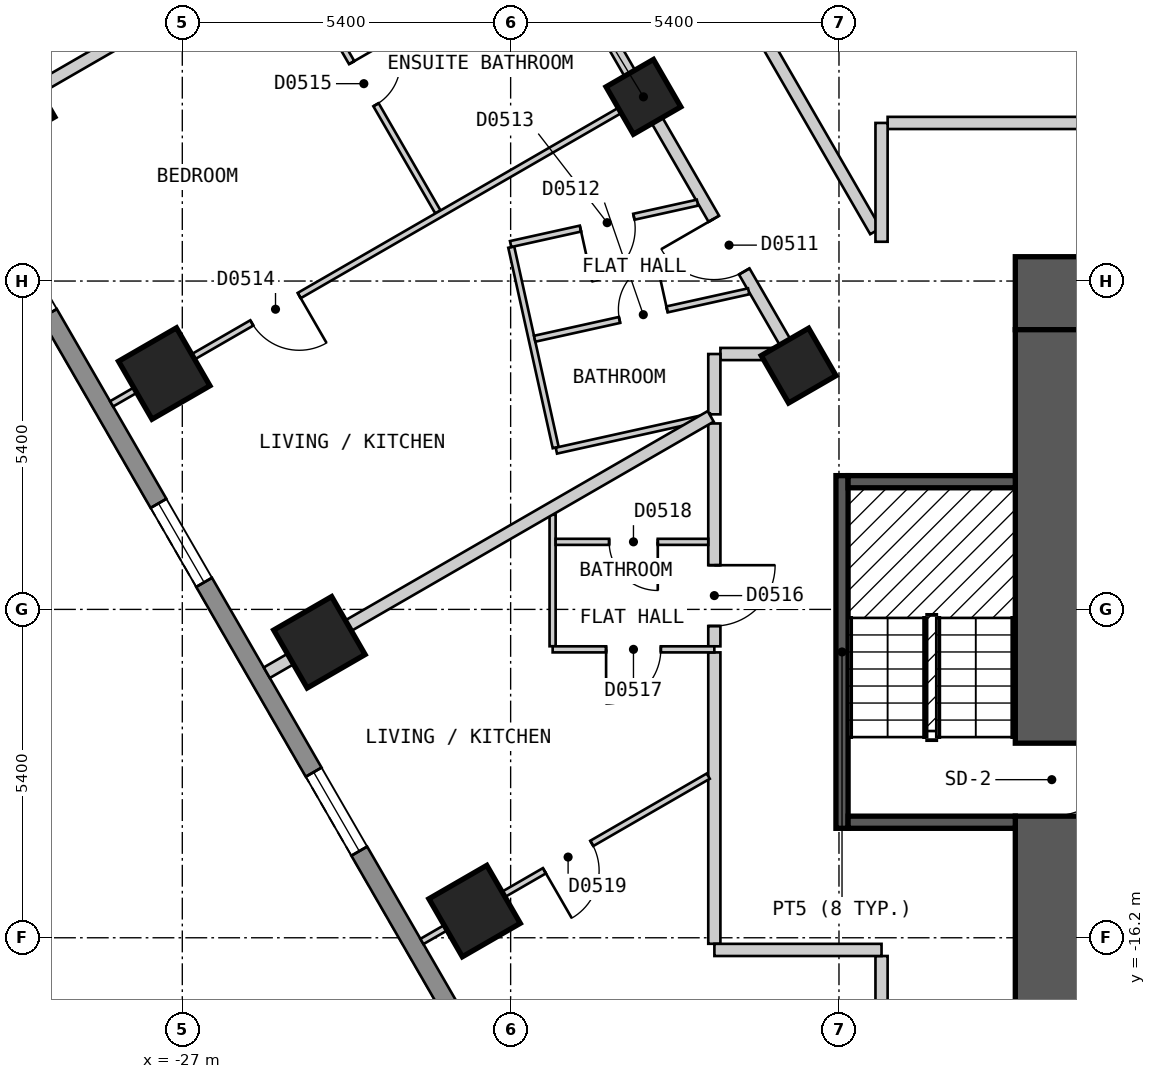
"""IFC4 building model, lengths in metres.
Left out: names, types, materials, properties, quantities, classifications, styles, units other than length and angle.
Written with IfcOpenShell. Run it as: python <this file> out.ifc"""

import sys

from ifc_helpers import new_model, si_unit, direction, frame, frame_2d, origin, origin_2d, place, context, subcontext, project, spatial, polyline, rectangle, outline, extrude, element, fill, save


model = new_model("IFC4")
c1 = context("Model", 3, precision=1e-05, world=origin(), true_north=direction((0.0, 1.0)))
c2 = subcontext(c1, "Body", "Model", "MODEL_VIEW")
j1 = project(units=[si_unit("LENGTHUNIT", "METRE"), si_unit("PLANEANGLEUNIT", "RADIAN")], contexts=[c1])
p1 = place(None, origin())
s1 = spatial("IfcSite", under=j1, at=p1, CompositionType="ELEMENT")
p2 = place(p1, origin())
s2 = spatial("IfcBuilding", under=s1, at=p2, CompositionType="ELEMENT")
p3 = place(p2, frame((0.0, 0.0, 56.4)))
s3 = spatial("IfcBuildingStorey", under=s2, at=p3, CompositionType="ELEMENT", Elevation=56.4)
for number, where, z_axis, x_axis in (
    (1, (-29.848, -2.5, 0.0), (0.0, 0.0, 1.0), (0.5, -0.866, 0.0)),
    (2, (-27.297, -6.921, 0.0), (0.0, 0.0, 1.0), (0.5, -0.866, 0.0)),
    (3, (-24.745, -11.341, 0.0), (0.0, 0.0, 1.0), (0.5, -0.866, 0.0)),
    (4, (-22.193, -15.761, 0.0), (0.0, 0.0, 1.0), (0.5, -0.866, 0.0)),
):
    element("IfcColumn", number, at=place(p3, frame(where, z_axis=z_axis, x_axis=x_axis)), inside=s3, PredefinedType="COLUMN", context=c2, shape_type="SweptSolid", body=[
        extrude(rectangle(XDim=1.1, YDim=1.1, at=origin_2d()), origin(), (0.0, 0.0, 1.0), 3.0),
    ])
for number, where, z_axis, x_axis in (
    (5, (-19.416, -2.371, 0.0), (0.0, 0.0, 1.0), (0.5, -0.866, 0.0)),
    (6, (-16.864, -6.791, 0.0), (0.0, 0.0, 1.0), (0.5, -0.866, 0.0)),
):
    element("IfcColumn", number, at=place(p3, frame(where, z_axis=z_axis, x_axis=x_axis)), inside=s3, PredefinedType="COLUMN", context=c2, shape_type="SweptSolid", body=[
        extrude(rectangle(XDim=0.9, YDim=0.9, at=origin_2d()), origin(), (0.0, 0.0, 1.0), 3.0),
    ])
p4 = place(p3, frame((-13.3, -5.6, 0.0), z_axis=(0.0, 0.0, 1.0), x_axis=(1.0, 0.0, 0.0)))
e7 = element("IfcWall", 7, at=p4, inside=s3, PredefinedType="SHEAR", context=c2, shape_type="SweptSolid", body=[
    extrude(rectangle(XDim=26.6, YDim=1.2, at=frame_2d((13.3, 0.0))), origin(), (0.0, 0.0, 1.0), 2.7),
])
p5 = place(p4, frame((23.65, 0.0, 0.0)))
e8 = element("IfcOpeningElement", 8, at=p5, cuts=e7, PredefinedType="OPENING", context=c2, shape_type="SweptSolid", body=[
    extrude(rectangle(XDim=1.2, YDim=2.1, at=frame_2d((0.6, 1.05))), frame((0.0, 0.61, 0.0), z_axis=(0.0, -1.0, 0.0), x_axis=(1.0, 0.0, 0.0)), (0.0, 0.0, 1.0), 1.22),
])
p6 = place(p3, frame((-12.7, -17.8, 0.0), z_axis=(0.0, 0.0, 1.0), x_axis=(0.0, 1.0, 0.0)))
e9 = element("IfcWall", 9, at=p6, inside=s3, PredefinedType="SHEAR", context=c2, shape_type="SweptSolid", body=[
    extrude(rectangle(XDim=11.6, YDim=1.2, at=frame_2d((5.8, 0.0))), origin(), (0.0, 0.0, 1.0), 2.7),
])
p7 = place(p6, frame((3.6, 0.0, 0.0)))
e10 = element("IfcOpeningElement", 10, at=p7, cuts=e9, PredefinedType="OPENING", context=c2, shape_type="SweptSolid", body=[
    extrude(rectangle(XDim=1.2, YDim=2.1, at=frame_2d((0.6, 1.05))), frame((0.0, 0.61, 0.0), z_axis=(0.0, -1.0, 0.0), x_axis=(1.0, 0.0, 0.0)), (0.0, 0.0, 1.0), 1.22),
])
p8 = place(p3, frame((-31.22, -2.425, 0.0), z_axis=(0.0, 0.0, 1.0), x_axis=(0.500001938803, -0.866024284413, 0.0)))
e11 = element("IfcWall", 11, at=p8, inside=s3, PredefinedType="SOLIDWALL", context=c2, shape_type="SweptSolid", body=[
    extrude(outline(polyline([(0.0, -0.15), (27.02, -0.15), (26.94, 0.15), (0.08, 0.15), (0.0, -0.15)])), origin(), (0.0, 0.0, 1.0), 2.7),
])
p9 = place(p8, frame((2.553, 0.0, 0.15)))
e12 = element("IfcOpeningElement", 12, at=p9, cuts=e11, PredefinedType="OPENING", context=c2, shape_type="SweptSolid", body=[
    extrude(rectangle(XDim=1.5, YDim=2.1, at=frame_2d((0.75, 1.05))), frame((0.0, 0.16, 0.0), z_axis=(0.0, -1.0, 0.0), x_axis=(1.0, 0.0, 0.0)), (0.0, 0.0, 1.0), 0.32),
])
p10 = place(p8, frame((7.657, 0.0, 0.15)))
e13 = element("IfcOpeningElement", 13, at=p10, cuts=e11, PredefinedType="OPENING", context=c2, shape_type="SweptSolid", body=[
    extrude(rectangle(XDim=1.5, YDim=2.1, at=frame_2d((0.75, 1.05))), frame((0.0, 0.16, 0.0), z_axis=(0.0, -1.0, 0.0), x_axis=(1.0, 0.0, 0.0)), (0.0, 0.0, 1.0), 0.32),
])
p11 = place(p8, frame((12.761, 0.0, 0.15)))
e14 = element("IfcOpeningElement", 14, at=p11, cuts=e11, PredefinedType="OPENING", context=c2, shape_type="SweptSolid", body=[
    extrude(rectangle(XDim=1.5, YDim=2.1, at=frame_2d((0.75, 1.05))), frame((0.0, 0.16, 0.0), z_axis=(0.0, -1.0, 0.0), x_axis=(1.0, 0.0, 0.0)), (0.0, 0.0, 1.0), 0.32),
])
p12 = place(p8, frame((17.865, 0.0, 0.15)))
e15 = element("IfcOpeningElement", 15, at=p12, cuts=e11, PredefinedType="OPENING", context=c2, shape_type="SweptSolid", body=[
    extrude(rectangle(XDim=1.5, YDim=2.1, at=frame_2d((0.75, 1.05))), frame((0.0, 0.16, 0.0), z_axis=(0.0, -1.0, 0.0), x_axis=(1.0, 0.0, 0.0)), (0.0, 0.0, 1.0), 0.32),
])
p13 = place(p8, frame((22.969, 0.0, 0.15)))
e16 = element("IfcOpeningElement", 16, at=p13, cuts=e11, PredefinedType="OPENING", context=c2, shape_type="SweptSolid", body=[
    extrude(rectangle(XDim=1.5, YDim=2.1, at=frame_2d((0.75, 1.05))), frame((0.0, 0.16, 0.0), z_axis=(0.0, -1.0, 0.0), x_axis=(1.0, 0.0, 0.0)), (0.0, 0.0, 1.0), 0.32),
])
p14 = place(p3, frame((-18.186, -0.101, 0.0), z_axis=(0.0, 0.0, 1.0), x_axis=(0.499997591167, -0.86602679452, 0.0)))
e17 = element("IfcWall", 17, at=p14, inside=s3, PredefinedType="PARTITIONING", context=c2, shape_type="SweptSolid", body=[
    extrude(rectangle(XDim=5.172, YDim=0.2, at=frame_2d((2.586, 0.0))), origin(), (0.0, 0.0, 1.0), 2.7),
])
p15 = place(p3, frame((-20.727, -0.101, 0.0), z_axis=(0.0, 0.0, 1.0), x_axis=(0.500065652488, -0.865987495984, 0.0)))
e18 = element("IfcWall", 18, at=p15, inside=s3, PredefinedType="PARTITIONING", context=c2, shape_type="SweptSolid", body=[
    extrude(rectangle(XDim=7.389, YDim=0.2, at=frame_2d((3.695, 0.0))), origin(), (0.0, 0.0, 1.0), 2.7),
])
p16 = place(p15, frame((4.937, 0.0, 0.0)))
e19 = element("IfcOpeningElement", 19, at=p16, cuts=e18, PredefinedType="OPENING", context=c2, shape_type="SweptSolid", body=[
    extrude(rectangle(XDim=1.0, YDim=2.1, at=frame_2d((0.5, 1.05))), frame((0.0, 0.11, 0.0), z_axis=(0.0, -1.0, 0.0), x_axis=(1.0, 0.0, 0.0)), (0.0, 0.0, 1.0), 0.22),
])
p17 = place(p3, frame((-15.5, -16.5, 0.0), z_axis=(0.0, 0.0, 1.0), x_axis=(0.0, -1.0, 0.0)))
e20 = element("IfcWall", 20, at=p17, inside=s3, PredefinedType="PARTITIONING", context=c2, shape_type="SweptSolid", body=[
    extrude(rectangle(XDim=1.175, YDim=0.2, at=frame_2d((0.587, 0.0))), origin(), (0.0, 0.0, 1.0), 2.7),
])
p18 = place(p3, frame((-18.25, -11.507, 0.0), z_axis=(0.0, 0.0, 1.0), x_axis=(0.0, -1.0, 0.0)))
e21 = element("IfcWall", 21, at=p18, inside=s3, PredefinedType="PARTITIONING", context=c2, shape_type="SweptSolid", body=[
    extrude(rectangle(XDim=4.792, YDim=0.2, at=frame_2d((2.396, 0.0))), origin(), (0.0, 0.0, 1.0), 2.7),
])
p19 = place(p3, frame((-18.15, -6.6, 0.0), z_axis=(0.0, 0.0, 1.0), x_axis=(1.0, 0.0, 0.0)))
e22 = element("IfcWall", 22, at=p19, inside=s3, PredefinedType="PARTITIONING", context=c2, shape_type="SweptSolid", body=[
    extrude(rectangle(XDim=1.176, YDim=0.2, at=frame_2d((0.588, 0.0))), origin(), (0.0, 0.0, 1.0), 2.7),
])
p20 = place(p3, frame((-18.249, -16.4, 0.0), z_axis=(0.0, 0.0, 1.0), x_axis=(1.0, 0.0, 0.0)))
e23 = element("IfcWall", 23, at=p20, inside=s3, PredefinedType="PARTITIONING", context=c2, shape_type="SweptSolid", body=[
    extrude(rectangle(XDim=2.749, YDim=0.2, at=frame_2d((1.375, 0.0))), origin(), (0.0, 0.0, 1.0), 2.7),
])
p21 = place(p3, frame((-15.4, -2.8, 0.0), z_axis=(0.0, 0.0, 1.0), x_axis=(1.0, 0.0, 0.0)))
e24 = element("IfcWall", 24, at=p21, inside=s3, PredefinedType="PARTITIONING", context=c2, shape_type="SweptSolid", body=[
    extrude(rectangle(XDim=8.372, YDim=0.2, at=frame_2d((4.186, 0.0))), origin(), (0.0, 0.0, 1.0), 2.7),
])
p22 = place(p3, frame((-15.5, -4.754, 0.0), z_axis=(0.0, 0.0, 1.0), x_axis=(0.0, 1.0, 0.0)))
e25 = element("IfcWall", 25, at=p22, inside=s3, PredefinedType="PARTITIONING", context=c2, shape_type="SweptSolid", body=[
    extrude(rectangle(XDim=1.954, YDim=0.2, at=frame_2d((0.977, 0.0))), origin(), (0.0, 0.0, 1.0), 2.7),
])
p23 = place(p3, frame((-18.25, -11.407, 0.0), z_axis=(0.0, 0.0, 1.0), x_axis=(0.0, 1.0, 0.0)))
e26 = element("IfcWall", 26, at=p23, inside=s3, PredefinedType="PARTITIONING", context=c2, shape_type="SweptSolid", body=[
    extrude(rectangle(XDim=3.665, YDim=0.2, at=frame_2d((1.833, 0.0))), origin(), (0.0, 0.0, 1.0), 2.7),
])
p24 = place(p23, frame((0.334, 0.0, 0.0)))
e27 = element("IfcOpeningElement", 27, at=p24, cuts=e26, PredefinedType="OPENING", context=c2, shape_type="SweptSolid", body=[
    extrude(rectangle(XDim=1.0, YDim=2.1, at=frame_2d((0.5, 1.05))), frame((0.0, 0.11, 0.0), z_axis=(0.0, -1.0, 0.0), x_axis=(1.0, 0.0, 0.0)), (0.0, 0.0, 1.0), 0.22),
])
p25 = place(p3, frame((-18.25, -7.592, 0.0), z_axis=(0.0, 0.0, 1.0), x_axis=(0.0, 1.0, 0.0)))
e28 = element("IfcWall", 28, at=p25, inside=s3, PredefinedType="PARTITIONING", context=c2, shape_type="SweptSolid", body=[
    extrude(rectangle(XDim=0.992, YDim=0.2, at=frame_2d((0.496, 0.0))), origin(), (0.0, 0.0, 1.0), 2.7),
])
p26 = place(p3, frame((-25.2, -0.101, 0.0), z_axis=(0.0, 0.0, 1.0), x_axis=(0.500099052605, -0.865968208183, 0.0)))
e29 = element("IfcWall", 29, at=p26, inside=s3, PredefinedType="PARTITIONING", context=c2, shape_type="SweptSolid", body=[
    extrude(rectangle(XDim=4.807, YDim=0.1, at=frame_2d((2.404, 0.0))), origin(), (0.0, 0.0, 1.0), 2.7),
])
p27 = place(p26, frame((1.971, 0.0, 0.0)))
e30 = element("IfcOpeningElement", 30, at=p27, cuts=e29, PredefinedType="OPENING", context=c2, shape_type="SweptSolid", body=[
    extrude(rectangle(XDim=0.8, YDim=2.1, at=frame_2d((0.4, 1.05))), frame((0.0, 0.06, 0.0), z_axis=(0.0, -1.0, 0.0), x_axis=(1.0, 0.0, 0.0)), (0.0, 0.0, 1.0), 0.12),
])
p28 = place(p3, frame((-21.59, -4.842, 0.0), z_axis=(0.0, 0.0, 1.0), x_axis=(0.216524734289, -0.976277132499, 0.0)))
e31 = element("IfcWall", 31, at=p28, inside=s3, PredefinedType="PARTITIONING", context=c2, shape_type="SweptSolid", body=[
    extrude(rectangle(XDim=3.377, YDim=0.1, at=frame_2d((1.688, 0.0))), origin(), (0.0, 0.0, 1.0), 2.7),
])
p29 = place(p3, frame((-20.91, -9.243, 0.0), z_axis=(0.0, 0.0, 1.0), x_axis=(0.0, -1.0, 0.0)))
e32 = element("IfcWall", 32, at=p29, inside=s3, PredefinedType="PARTITIONING", context=c2, shape_type="SweptSolid", body=[
    extrude(rectangle(XDim=2.163, YDim=0.1, at=frame_2d((1.082, 0.0))), origin(), (0.0, 0.0, 1.0), 2.7),
])
p30 = place(p3, frame((-20.86, -9.689, 0.0), z_axis=(0.0, 0.0, 1.0), x_axis=(1.0, 0.0, 0.0)))
e33 = element("IfcWall", 33, at=p30, inside=s3, PredefinedType="PARTITIONING", context=c2, shape_type="SweptSolid", body=[
    extrude(rectangle(XDim=2.51, YDim=0.1, at=frame_2d((1.255, 0.0))), origin(), (0.0, 0.0, 1.0), 2.7),
])
p31 = place(p30, frame((0.88, 0.0, 0.0)))
e34 = element("IfcOpeningElement", 34, at=p31, cuts=e33, PredefinedType="OPENING", context=c2, shape_type="SweptSolid", body=[
    extrude(rectangle(XDim=0.8, YDim=2.1, at=frame_2d((0.4, 1.05))), frame((0.0, 0.06, 0.0), z_axis=(0.0, -1.0, 0.0), x_axis=(1.0, 0.0, 0.0)), (0.0, 0.0, 1.0), 0.12),
])
p32 = place(p3, frame((-20.909, -11.457, 0.0), z_axis=(0.0, 0.0, 1.0), x_axis=(1.0, 0.0, 0.0)))
e35 = element("IfcWall", 35, at=p32, inside=s3, PredefinedType="PARTITIONING", context=c2, shape_type="SweptSolid", body=[
    extrude(rectangle(XDim=2.659, YDim=0.1, at=frame_2d((1.33, 0.0))), origin(), (0.0, 0.0, 1.0), 2.7),
])
p33 = place(p32, frame((0.879, 0.0, 0.0)))
e36 = element("IfcOpeningElement", 36, at=p33, cuts=e35, PredefinedType="OPENING", context=c2, shape_type="SweptSolid", body=[
    extrude(rectangle(XDim=0.9, YDim=2.1, at=frame_2d((0.45, 1.05))), frame((0.0, 0.06, 0.0), z_axis=(0.0, -1.0, 0.0), x_axis=(1.0, 0.0, 0.0)), (0.0, 0.0, 1.0), 0.12),
])
p34 = place(p3, frame((-20.848, -8.189, 0.0), z_axis=(0.0, 0.0, 1.0), x_axis=(0.976266547712, 0.216572453971, 0.0)))
e37 = element("IfcWall", 37, at=p34, inside=s3, PredefinedType="PARTITIONING", context=c2, shape_type="SweptSolid", body=[
    extrude(rectangle(XDim=2.6, YDim=0.1, at=frame_2d((1.3, 0.0))), origin(), (0.0, 0.0, 1.0), 2.7),
])
p35 = place(p3, frame((-21.205, -6.349, 0.0), z_axis=(0.0, 0.0, 1.0), x_axis=(0.976315944397, 0.216349663084, 0.0)))
e38 = element("IfcWall", 38, at=p35, inside=s3, PredefinedType="PARTITIONING", context=c2, shape_type="SweptSolid", body=[
    extrude(rectangle(XDim=3.605, YDim=0.1, at=frame_2d((1.803, 0.0))), origin(), (0.0, 0.0, 1.0), 2.7),
])
p36 = place(p35, frame((1.43, 0.0, 0.0)))
e39 = element("IfcOpeningElement", 39, at=p36, cuts=e38, PredefinedType="OPENING", context=c2, shape_type="SweptSolid", body=[
    extrude(rectangle(XDim=0.8, YDim=2.1, at=frame_2d((0.4, 1.05))), frame((0.0, 0.06, 0.0), z_axis=(0.0, -1.0, 0.0), x_axis=(1.0, 0.0, 0.0)), (0.0, 0.0, 1.0), 0.12),
])
p37 = place(p3, frame((-21.6, -4.792, 0.0), z_axis=(0.0, 0.0, 1.0), x_axis=(0.976320106661, 0.216330879278, 0.0)))
e40 = element("IfcWall", 40, at=p37, inside=s3, PredefinedType="PARTITIONING", context=c2, shape_type="SweptSolid", body=[
    extrude(rectangle(XDim=3.147, YDim=0.1, at=frame_2d((1.574, 0.0))), origin(), (0.0, 0.0, 1.0), 2.7),
])
p38 = place(p37, frame((1.176, 0.0, 0.0)))
e41 = element("IfcOpeningElement", 41, at=p38, cuts=e40, PredefinedType="OPENING", context=c2, shape_type="SweptSolid", body=[
    extrude(rectangle(XDim=0.9, YDim=2.1, at=frame_2d((0.45, 1.05))), frame((0.0, 0.06, 0.0), z_axis=(0.0, -1.0, 0.0), x_axis=(1.0, 0.0, 0.0)), (0.0, 0.0, 1.0), 0.12),
])
p39 = place(p3, frame((-23.059, -16.261, 0.0), z_axis=(0.0, 0.0, 1.0), x_axis=(0.866004639177, 0.500035963631, 0.0)))
e42 = element("IfcWall", 42, at=p39, inside=s3, PredefinedType="PARTITIONING", context=c2, shape_type="SweptSolid", body=[
    extrude(rectangle(XDim=5.438, YDim=0.1, at=frame_2d((2.719, 0.0))), origin(), (0.0, 0.0, 1.0), 2.7),
])
p40 = place(p39, frame((2.326, 0.0, 0.0)))
e43 = element("IfcOpeningElement", 43, at=p40, cuts=e42, PredefinedType="OPENING", context=c2, shape_type="SweptSolid", body=[
    extrude(rectangle(XDim=0.9, YDim=2.1, at=frame_2d((0.45, 1.05))), frame((0.0, 0.06, 0.0), z_axis=(0.0, -1.0, 0.0), x_axis=(1.0, 0.0, 0.0)), (0.0, 0.0, 1.0), 0.12),
])
p41 = place(p3, frame((-28.163, -7.42, 0.0), z_axis=(0.0, 0.0, 1.0), x_axis=(0.866065245018, 0.499930986609, 0.0)))
e44 = element("IfcWall", 44, at=p41, inside=s3, PredefinedType="PARTITIONING", context=c2, shape_type="SweptSolid", body=[
    extrude(rectangle(XDim=10.0, YDim=0.1, at=frame_2d((5.0, 0.0))), origin(), (0.0, 0.0, 1.0), 2.7),
])
p42 = place(p41, frame((2.663, 0.0, 0.0)))
e45 = element("IfcOpeningElement", 45, at=p42, cuts=e44, PredefinedType="OPENING", context=c2, shape_type="SweptSolid", body=[
    extrude(rectangle(XDim=0.9, YDim=2.1, at=frame_2d((0.45, 1.05))), frame((0.0, 0.06, 0.0), z_axis=(0.0, -1.0, 0.0), x_axis=(1.0, 0.0, 0.0)), (0.0, 0.0, 1.0), 0.12),
])
p43 = place(p3, frame((-30.715, -3.0, 0.0), z_axis=(0.0, 0.0, 1.0), x_axis=(0.86609140076, 0.499885672459, 0.0)))
e46 = element("IfcWall", 46, at=p43, inside=s3, PredefinedType="PARTITIONING", context=c2, shape_type="SweptSolid", body=[
    extrude(rectangle(XDim=6.0, YDim=0.2, at=frame_2d((3.0, 0.0))), origin(), (0.0, 0.0, 1.0), 2.7),
])
p44 = place(p3, frame((-25.61, -11.841, 0.0), z_axis=(0.0, 0.0, 1.0), x_axis=(0.866004715254, 0.500035831874, 0.0)))
e47 = element("IfcWall", 47, at=p44, inside=s3, PredefinedType="PARTITIONING", context=c2, shape_type="SweptSolid", body=[
    extrude(rectangle(XDim=8.43, YDim=0.2, at=frame_2d((4.215, 0.0))), origin(), (0.0, 0.0, 1.0), 2.7),
])
p45 = place(p3, frame((-16.15, -14.4, 0.0), z_axis=(0.0, 0.0, 1.0), x_axis=(0.0, 1.0, 0.0)))
e48 = element("IfcWall", 48, at=p45, inside=s3, PredefinedType="SOLIDWALL", context=c2, shape_type="SweptSolid", body=[
    extrude(rectangle(XDim=5.8, YDim=0.2, at=frame_2d((2.9, 0.0))), origin(), (0.0, 0.0, 1.0), 2.7),
])
for number, where, z_axis, x_axis in (
    (49, (-16.05, -14.3, 0.0), (0.0, 0.0, 1.0), (1.0, 0.0, 0.0)),
    (50, (-16.05, -8.7, 0.0), (0.0, 0.0, 1.0), (1.0, 0.0, 0.0)),
):
    element("IfcWall", number, at=place(p3, frame(where, z_axis=z_axis, x_axis=x_axis)), inside=s3, PredefinedType="SOLIDWALL", context=c2, shape_type="SweptSolid", body=[
        extrude(rectangle(XDim=2.75, YDim=0.2, at=frame_2d((1.375, 0.0))), origin(), (0.0, 0.0, 1.0), 2.7),
    ])
p46 = place(p10, origin())
e51 = element("IfcWindow", 51, at=p46, inside=s3, PartitioningType="SINGLE_PANEL", PredefinedType="WINDOW", context=c2, shape_type="SweptSolid", body=[
    extrude(rectangle(XDim=1.5, YDim=2.1, at=frame_2d((0.75, 1.05))), frame((0.0, 0.03, 0.0), z_axis=(0.0, -1.0, 0.0), x_axis=(1.0, 0.0, 0.0)), (0.0, 0.0, 1.0), 0.06),
])
fill(e13, e51)
p47 = place(p11, origin())
e52 = element("IfcWindow", 52, at=p47, inside=s3, PartitioningType="SINGLE_PANEL", PredefinedType="WINDOW", context=c2, shape_type="SweptSolid", body=[
    extrude(rectangle(XDim=1.5, YDim=2.1, at=frame_2d((0.75, 1.05))), frame((0.0, 0.03, 0.0), z_axis=(0.0, -1.0, 0.0), x_axis=(1.0, 0.0, 0.0)), (0.0, 0.0, 1.0), 0.06),
])
fill(e14, e52)
p48 = place(p16, origin())
e53 = element("IfcDoor", 53, at=p48, inside=s3, OperationType="SINGLE_SWING_LEFT", PredefinedType="DOOR", context=c2, shape_type="SweptSolid", body=[
    extrude(rectangle(XDim=1.0, YDim=2.1, at=frame_2d((0.5, 1.05))), frame((0.0, 0.025, 0.0), z_axis=(0.0, -1.0, 0.0), x_axis=(1.0, 0.0, 0.0)), (0.0, 0.0, 1.0), 0.05),
])
fill(e19, e53)
p49 = place(p36, origin())
e54 = element("IfcDoor", 54, at=p49, inside=s3, OperationType="SINGLE_SWING_RIGHT", PredefinedType="DOOR", context=c2, shape_type="SweptSolid", body=[
    extrude(rectangle(XDim=0.8, YDim=2.1, at=frame_2d((0.4, 1.05))), frame((0.0, 0.025, 0.0), z_axis=(0.0, -1.0, 0.0), x_axis=(1.0, 0.0, 0.0)), (0.0, 0.0, 1.0), 0.05),
])
fill(e39, e54)
p50 = place(p38, origin())
e55 = element("IfcDoor", 55, at=p50, inside=s3, OperationType="SINGLE_SWING_LEFT", PredefinedType="DOOR", context=c2, shape_type="SweptSolid", body=[
    extrude(rectangle(XDim=0.9, YDim=2.1, at=frame_2d((0.45, 1.05))), frame((0.0, 0.025, 0.0), z_axis=(0.0, -1.0, 0.0), x_axis=(1.0, 0.0, 0.0)), (0.0, 0.0, 1.0), 0.05),
])
fill(e41, e55)
p51 = place(p42, origin())
e56 = element("IfcDoor", 56, at=p51, inside=s3, OperationType="SINGLE_SWING_RIGHT", PredefinedType="DOOR", context=c2, shape_type="SweptSolid", body=[
    extrude(rectangle(XDim=0.9, YDim=2.1, at=frame_2d((0.45, 1.05))), frame((0.0, 0.025, 0.0), z_axis=(0.0, -1.0, 0.0), x_axis=(1.0, 0.0, 0.0)), (0.0, 0.0, 1.0), 0.05),
])
fill(e45, e56)
p52 = place(p27, origin())
e57 = element("IfcDoor", 57, at=p52, inside=s3, OperationType="SINGLE_SWING_LEFT", PredefinedType="DOOR", context=c2, shape_type="SweptSolid", body=[
    extrude(rectangle(XDim=0.8, YDim=2.1, at=frame_2d((0.4, 1.05))), frame((0.0, 0.025, 0.0), z_axis=(0.0, -1.0, 0.0), x_axis=(1.0, 0.0, 0.0)), (0.0, 0.0, 1.0), 0.05),
])
fill(e30, e57)
p53 = place(p24, origin())
e58 = element("IfcDoor", 58, at=p53, inside=s3, OperationType="SINGLE_SWING_RIGHT", PredefinedType="DOOR", context=c2, shape_type="SweptSolid", body=[
    extrude(rectangle(XDim=1.0, YDim=2.1, at=frame_2d((0.5, 1.05))), frame((0.0, 0.025, 0.0), z_axis=(0.0, -1.0, 0.0), x_axis=(1.0, 0.0, 0.0)), (0.0, 0.0, 1.0), 0.05),
])
fill(e27, e58)
p54 = place(p33, origin())
e59 = element("IfcDoor", 59, at=p54, inside=s3, OperationType="SINGLE_SWING_LEFT", PredefinedType="DOOR", context=c2, shape_type="SweptSolid", body=[
    extrude(rectangle(XDim=0.9, YDim=2.1, at=frame_2d((0.45, 1.05))), frame((0.0, 0.025, 0.0), z_axis=(0.0, -1.0, 0.0), x_axis=(1.0, 0.0, 0.0)), (0.0, 0.0, 1.0), 0.05),
])
fill(e36, e59)
p55 = place(p31, origin())
e60 = element("IfcDoor", 60, at=p55, inside=s3, OperationType="SINGLE_SWING_RIGHT", PredefinedType="DOOR", context=c2, shape_type="SweptSolid", body=[
    extrude(rectangle(XDim=0.8, YDim=2.1, at=frame_2d((0.4, 1.05))), frame((0.0, 0.025, 0.0), z_axis=(0.0, -1.0, 0.0), x_axis=(1.0, 0.0, 0.0)), (0.0, 0.0, 1.0), 0.05),
])
fill(e34, e60)
p56 = place(p40, origin())
e61 = element("IfcDoor", 61, at=p56, inside=s3, OperationType="SINGLE_SWING_LEFT", PredefinedType="DOOR", context=c2, shape_type="SweptSolid", body=[
    extrude(rectangle(XDim=0.9, YDim=2.1, at=frame_2d((0.45, 1.05))), frame((0.0, 0.025, 0.0), z_axis=(0.0, -1.0, 0.0), x_axis=(1.0, 0.0, 0.0)), (0.0, 0.0, 1.0), 0.05),
])
fill(e43, e61)
p57 = place(p7, origin())
e62 = element("IfcDoor", 62, at=p57, inside=s3, OperationType="SINGLE_SWING_RIGHT", PredefinedType="DOOR", context=c2, shape_type="SweptSolid", body=[
    extrude(rectangle(XDim=1.2, YDim=2.1, at=frame_2d((0.6, 1.05))), frame((0.0, 0.025, 0.0), z_axis=(0.0, -1.0, 0.0), x_axis=(1.0, 0.0, 0.0)), (0.0, 0.0, 1.0), 0.05),
])
fill(e10, e62)
save(model, sys.argv[1])
